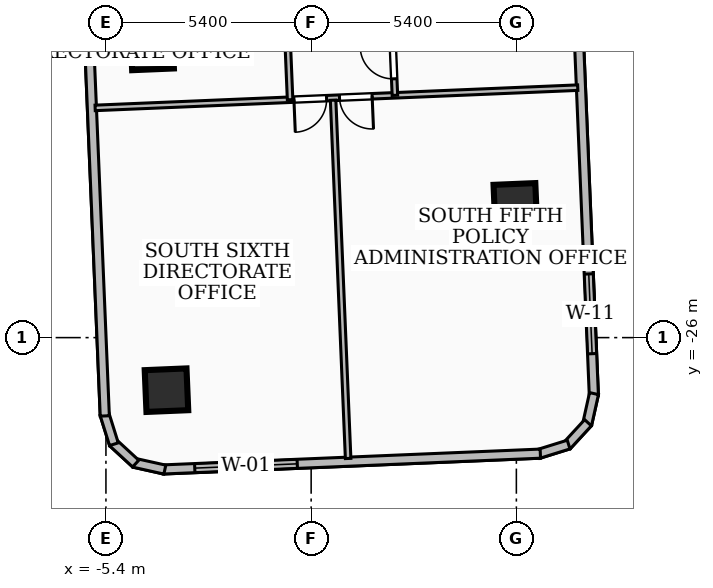
"""IFC4 building model, lengths in metres.
Left out: names, types, materials, properties, quantities, classifications, styles, units other than length and angle.
Written with IfcOpenShell. Run it as: python <this file> out.ifc"""

import sys

from ifc_helpers import new_model, si_unit, direction, frame, frame_2d, origin, origin_2d, place, context, subcontext, project, spatial, rectangle, extrude, element, fill, save


model = new_model("IFC4")
c1 = context("Model", 3, precision=1e-05, world=origin(), true_north=direction((0.0, 1.0)))
c2 = subcontext(c1, "Body", "Model", "MODEL_VIEW")
j1 = project(units=[si_unit("LENGTHUNIT", "METRE"), si_unit("PLANEANGLEUNIT", "RADIAN")], contexts=[c1])
p1 = place(None, origin())
s1 = spatial("IfcSite", under=j1, at=p1, CompositionType="ELEMENT")
p2 = place(p1, origin())
s2 = spatial("IfcBuilding", under=s1, at=p2, CompositionType="ELEMENT")
p3 = place(p2, frame((0.0, 0.0, 46.08)))
s3 = spatial("IfcBuildingStorey", under=s2, at=p3, CompositionType="ELEMENT", Elevation=46.08)
for number, where, z_axis, x_axis in (
    (1, (-4.184, -18.391, 0.0), (0.0, 0.0, 1.0), (0.999, 0.042, 0.0)),
    (2, (-3.807, -27.383, 0.0), (0.0, 0.0, 1.0), (0.999, 0.042, 0.0)),
    (3, (5.372, -22.507, 0.0), (0.0, 0.0, 1.0), (0.999, 0.042, 0.0)),
):
    element("IfcColumn", number, at=place(p3, frame(where, z_axis=z_axis, x_axis=x_axis)), inside=s3, PredefinedType="COLUMN", context=c2, shape_type="SweptSolid", body=[
        extrude(rectangle(XDim=1.1, YDim=1.1, at=origin_2d()), origin(), (0.0, 0.0, 1.0), 3.6),
    ])
p4 = place(p3, frame((6.875, -14.058, 0.0), z_axis=(0.0, 0.0, 1.0), x_axis=(0.041850586852, -0.999123880397, 0.0)))
e4 = element("IfcWall", 4, at=p4, inside=s3, PredefinedType="SOLIDWALL", context=c2, shape_type="SweptSolid", body=[
    extrude(rectangle(XDim=13.476, YDim=0.24, at=frame_2d((6.738, 0.0))), origin(), (0.0, 0.0, 1.0), 3.32),
])
p5 = place(p4, frame((10.276, 0.0, 0.85)))
e5 = element("IfcOpeningElement", 5, at=p5, cuts=e4, PredefinedType="OPENING", context=c2, shape_type="SweptSolid", body=[
    extrude(rectangle(XDim=2.1, YDim=1.6, at=frame_2d((1.05, 0.8))), frame((0.0, 0.13, 0.0), z_axis=(0.0, -1.0, 0.0), x_axis=(1.0, 0.0, 0.0)), (0.0, 0.0, 1.0), 0.26),
])
p6 = place(p3, frame((7.443, -27.473, 0.0), z_axis=(0.0, 0.0, 1.0), x_axis=(-0.21736704137, -0.976089939158, 0.0)))
e6 = element("IfcWall", 6, at=p6, inside=s3, PredefinedType="SOLIDWALL", context=c2, shape_type="SweptSolid", body=[
    extrude(rectangle(XDim=0.829, YDim=0.24, at=frame_2d((0.415, 0.0))), origin(), (0.0, 0.0, 1.0), 3.32),
])
p7 = place(p3, frame((7.285, -28.24, 0.0), z_axis=(0.0, 0.0, 1.0), x_axis=(-0.676946063044, -0.73603262681, 0.0)))
e7 = element("IfcWall", 7, at=p7, inside=s3, PredefinedType="SOLIDWALL", context=c2, shape_type="SweptSolid", body=[
    extrude(rectangle(XDim=0.814, YDim=0.24, at=frame_2d((0.407, 0.0))), origin(), (0.0, 0.0, 1.0), 3.32),
])
p8 = place(p3, frame((6.775, -28.814, 0.0), z_axis=(0.0, 0.0, 1.0), x_axis=(-0.954730695464, -0.297471509794, 0.0)))
e8 = element("IfcWall", 8, at=p8, inside=s3, PredefinedType="SOLIDWALL", context=c2, shape_type="SweptSolid", body=[
    extrude(rectangle(XDim=0.831, YDim=0.24, at=frame_2d((0.415, 0.0))), origin(), (0.0, 0.0, 1.0), 3.32),
])
p9 = place(p3, frame((6.031, -29.053, 0.0), z_axis=(0.0, 0.0, 1.0), x_axis=(-0.999123553269, -0.041858395859, 0.0)))
e9 = element("IfcWall", 9, at=p9, inside=s3, PredefinedType="SOLIDWALL", context=c2, shape_type="SweptSolid", body=[
    extrude(rectangle(XDim=9.939, YDim=0.24, at=frame_2d((4.969, 0.0))), origin(), (0.0, 0.0, 1.0), 3.32),
])
p10 = place(p9, frame((6.402, 0.0, 0.85)))
e10 = element("IfcOpeningElement", 10, at=p10, cuts=e9, PredefinedType="OPENING", context=c2, shape_type="SweptSolid", body=[
    extrude(rectangle(XDim=2.7, YDim=2.1, at=frame_2d((1.35, 1.05))), frame((0.0, 0.13, 0.0), z_axis=(0.0, -1.0, 0.0), x_axis=(1.0, 0.0, 0.0)), (0.0, 0.0, 1.0), 0.26),
])
p11 = place(p3, frame((-3.85, -29.473, 0.0), z_axis=(0.0, 0.0, 1.0), x_axis=(-0.976138507006, 0.217148831773, 0.0)))
e11 = element("IfcWall", 11, at=p11, inside=s3, PredefinedType="SOLIDWALL", context=c2, shape_type="SweptSolid", body=[
    extrude(rectangle(XDim=0.829, YDim=0.24, at=frame_2d((0.414, 0.0))), origin(), (0.0, 0.0, 1.0), 3.32),
])
p12 = place(p3, frame((-4.617, -29.315, 0.0), z_axis=(0.0, 0.0, 1.0), x_axis=(-0.735482115769, 0.677544136853, 0.0)))
e12 = element("IfcWall", 12, at=p12, inside=s3, PredefinedType="SOLIDWALL", context=c2, shape_type="SweptSolid", body=[
    extrude(rectangle(XDim=0.813, YDim=0.24, at=frame_2d((0.407, 0.0))), origin(), (0.0, 0.0, 1.0), 3.32),
])
p13 = place(p3, frame((-5.19, -28.805, 0.0), z_axis=(0.0, 0.0, 1.0), x_axis=(-0.298542680168, 0.954396284631, 0.0)))
e13 = element("IfcWall", 13, at=p13, inside=s3, PredefinedType="SOLIDWALL", context=c2, shape_type="SweptSolid", body=[
    extrude(rectangle(XDim=0.831, YDim=0.24, at=frame_2d((0.416, 0.0))), origin(), (0.0, 0.0, 1.0), 3.32),
])
p14 = place(p3, frame((-5.43, -28.061, 0.0), z_axis=(0.0, 0.0, 1.0), x_axis=(-0.041852859621, 0.999123785195, 0.0)))
e14 = element("IfcWall", 14, at=p14, inside=s3, PredefinedType="SOLIDWALL", context=c2, shape_type="SweptSolid", body=[
    extrude(rectangle(XDim=13.475, YDim=0.24, at=frame_2d((6.737, 0.0))), origin(), (0.0, 0.0, 1.0), 2.401),
])
p15 = place(p3, frame((2.204, -19.625, 0.0), z_axis=(0.0, 0.0, 1.0), x_axis=(-0.041970303018, 0.999118858627, 0.0)))
e15 = element("IfcWall", 15, at=p15, inside=s3, PredefinedType="PARTITIONING", context=c2, shape_type="SweptSolid", body=[
    extrude(rectangle(XDim=5.41, YDim=0.145, at=frame_2d((2.705, 0.0))), origin(), (0.0, 0.0, 1.0), 3.32),
])
p16 = place(p15, frame((3.14, 0.0, 0.0)))
e16 = element("IfcOpeningElement", 16, at=p16, cuts=e15, PredefinedType="OPENING", context=c2, shape_type="SweptSolid", body=[
    extrude(rectangle(XDim=0.86, YDim=2.04, at=frame_2d((0.43, 1.02))), frame((0.0, 0.083, 0.0), z_axis=(0.0, -1.0, 0.0), x_axis=(1.0, 0.0, 0.0)), (0.0, 0.0, 1.0), 0.165),
])
p17 = place(p15, frame((0.435, 0.0, 0.0)))
e17 = element("IfcOpeningElement", 17, at=p17, cuts=e15, PredefinedType="OPENING", context=c2, shape_type="SweptSolid", body=[
    extrude(rectangle(XDim=0.86, YDim=2.04, at=frame_2d((0.43, 1.02))), frame((0.0, 0.083, 0.0), z_axis=(0.0, -1.0, 0.0), x_axis=(1.0, 0.0, 0.0)), (0.0, 0.0, 1.0), 0.165),
])
p18 = place(p3, frame((-0.78, -14.335, 0.0), z_axis=(0.0, 0.0, 1.0), x_axis=(0.041782565573, -0.999126727304, 0.0)))
e18 = element("IfcWall", 18, at=p18, inside=s3, PredefinedType="PARTITIONING", context=c2, shape_type="SweptSolid", body=[
    extrude(rectangle(XDim=5.411, YDim=0.145, at=frame_2d((2.705, 0.0))), origin(), (0.0, 0.0, 1.0), 3.32),
])
p19 = place(p18, frame((0.435, 0.0, 0.0)))
e19 = element("IfcOpeningElement", 19, at=p19, cuts=e18, PredefinedType="OPENING", context=c2, shape_type="SweptSolid", body=[
    extrude(rectangle(XDim=0.86, YDim=2.04, at=frame_2d((0.43, 1.02))), frame((0.0, 0.083, 0.0), z_axis=(0.0, -1.0, 0.0), x_axis=(1.0, 0.0, 0.0)), (0.0, 0.0, 1.0), 0.165),
])
p20 = place(p18, frame((3.14, 0.0, 0.0)))
e20 = element("IfcOpeningElement", 20, at=p20, cuts=e18, PredefinedType="OPENING", context=c2, shape_type="SweptSolid", body=[
    extrude(rectangle(XDim=0.86, YDim=2.04, at=frame_2d((0.43, 1.02))), frame((0.0, 0.083, 0.0), z_axis=(0.0, -1.0, 0.0), x_axis=(1.0, 0.0, 0.0)), (0.0, 0.0, 1.0), 0.165),
])
p21 = place(p3, frame((0.578, -19.753, 0.0), z_axis=(0.0, 0.0, 1.0), x_axis=(0.041866246522, -0.999123224333, 0.0)))
e21 = element("IfcWall", 21, at=p21, inside=s3, PredefinedType="PARTITIONING", context=c2, shape_type="SweptSolid", body=[
    extrude(rectangle(XDim=9.435, YDim=0.145, at=frame_2d((4.718, 0.0))), origin(), (0.0, 0.0, 1.0), 2.812),
])
p22 = place(p3, frame((7.015, -19.423, 0.0), z_axis=(0.0, 0.0, 1.0), x_axis=(-0.99912047737, -0.041931750497, 0.0)))
e22 = element("IfcWall", 22, at=p22, inside=s3, PredefinedType="PARTITIONING", context=c2, shape_type="SweptSolid", body=[
    extrude(rectangle(XDim=12.71, YDim=0.145, at=frame_2d((6.355, 0.0))), origin(), (0.0, 0.0, 1.0), 2.401),
])
p23 = place(p22, frame((6.615, 0.0, 0.0)))
e23 = element("IfcOpeningElement", 23, at=p23, cuts=e22, PredefinedType="OPENING", context=c2, shape_type="SweptSolid", body=[
    extrude(rectangle(XDim=0.86, YDim=2.04, at=frame_2d((0.43, 1.02))), frame((0.0, 0.083, 0.0), z_axis=(0.0, -1.0, 0.0), x_axis=(1.0, 0.0, 0.0)), (0.0, 0.0, 1.0), 0.165),
])
p24 = place(p22, frame((5.415, 0.0, 0.0)))
e24 = element("IfcOpeningElement", 24, at=p24, cuts=e22, PredefinedType="OPENING", context=c2, shape_type="SweptSolid", body=[
    extrude(rectangle(XDim=0.86, YDim=2.04, at=frame_2d((0.43, 1.02))), frame((0.0, 0.083, 0.0), z_axis=(0.0, -1.0, 0.0), x_axis=(1.0, 0.0, 0.0)), (0.0, 0.0, 1.0), 0.165),
])
p25 = place(p5, origin())
e25 = element("IfcWindow", 25, at=p25, inside=s3, PartitioningType="SINGLE_PANEL", PredefinedType="WINDOW", context=c2, shape_type="SweptSolid", body=[
    extrude(rectangle(XDim=2.1, YDim=1.6, at=frame_2d((1.05, 0.8))), frame((0.0, 0.03, 0.0), z_axis=(0.0, -1.0, 0.0), x_axis=(1.0, 0.0, 0.0)), (0.0, 0.0, 1.0), 0.06),
])
fill(e5, e25)
p26 = place(p10, origin())
e26 = element("IfcWindow", 26, at=p26, inside=s3, PartitioningType="SINGLE_PANEL", PredefinedType="WINDOW", context=c2, shape_type="SweptSolid", body=[
    extrude(rectangle(XDim=2.7, YDim=2.1, at=frame_2d((1.35, 1.05))), frame((0.0, 0.03, 0.0), z_axis=(0.0, -1.0, 0.0), x_axis=(1.0, 0.0, 0.0)), (0.0, 0.0, 1.0), 0.06),
])
fill(e10, e26)
p27 = place(p17, origin())
e27 = element("IfcDoor", 27, at=p27, inside=s3, OperationType="SINGLE_SWING_RIGHT", PredefinedType="DOOR", context=c2, shape_type="SweptSolid", body=[
    extrude(rectangle(XDim=0.86, YDim=2.04, at=frame_2d((0.43, 1.02))), frame((0.0, 0.025, 0.0), z_axis=(0.0, -1.0, 0.0), x_axis=(1.0, 0.0, 0.0)), (0.0, 0.0, 1.0), 0.05),
])
fill(e17, e27)
p28 = place(p23, origin())
e28 = element("IfcDoor", 28, at=p28, inside=s3, OperationType="SINGLE_SWING_RIGHT", PredefinedType="DOOR", context=c2, shape_type="SweptSolid", body=[
    extrude(rectangle(XDim=0.86, YDim=2.04, at=frame_2d((0.43, 1.02))), frame((0.0, 0.025, 0.0), z_axis=(0.0, -1.0, 0.0), x_axis=(1.0, 0.0, 0.0)), (0.0, 0.0, 1.0), 0.05),
])
fill(e23, e28)
p29 = place(p24, origin())
e29 = element("IfcDoor", 29, at=p29, inside=s3, OperationType="SINGLE_SWING_LEFT", PredefinedType="DOOR", context=c2, shape_type="SweptSolid", body=[
    extrude(rectangle(XDim=0.86, YDim=2.04, at=frame_2d((0.43, 1.02))), frame((0.0, 0.025, 0.0), z_axis=(0.0, -1.0, 0.0), x_axis=(1.0, 0.0, 0.0)), (0.0, 0.0, 1.0), 0.05),
])
fill(e24, e29)
save(model, sys.argv[1])
